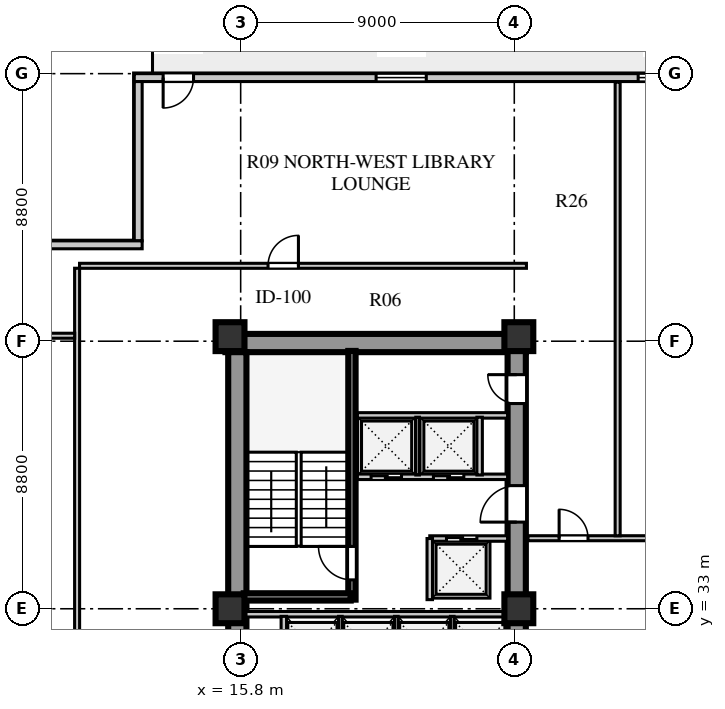
"""IFC4 building model, lengths in metres.
Left out: names, types, materials, properties, quantities, classifications, styles, units other than length and angle.
Written with IfcOpenShell. Run it as: python <this file> out.ifc"""

import sys

from ifc_helpers import new_model, si_unit, direction, frame, frame_2d, origin, origin_2d, place, context, subcontext, project, spatial, rectangle, extrude, element, fill, save


model = new_model("IFC4")
c1 = context("Model", 3, precision=1e-05, world=origin(), true_north=direction((0.0, 1.0)))
c2 = subcontext(c1, "Body", "Model", "MODEL_VIEW")
j1 = project(units=[si_unit("LENGTHUNIT", "METRE"), si_unit("PLANEANGLEUNIT", "RADIAN")], contexts=[c1])
p1 = place(None, origin())
s1 = spatial("IfcSite", under=j1, at=p1, CompositionType="ELEMENT")
p2 = place(p1, origin())
s2 = spatial("IfcBuilding", under=s1, at=p2, CompositionType="ELEMENT")
p3 = place(p2, frame((0.0, 0.0, 66.0)))
s3 = spatial("IfcBuildingStorey", under=s2, at=p3, CompositionType="ELEMENT", Elevation=66.0)
p4 = place(p3, frame((15.3, 41.74, 0.0), z_axis=(0.0, 0.0, 1.0), x_axis=(1.0, 0.0, 0.0)))
e1 = element("IfcWall", 1, at=p4, inside=s3, PredefinedType="SHEAR", context=c2, shape_type="SweptSolid", body=[
    extrude(rectangle(XDim=9.88, YDim=0.6, at=frame_2d((4.94, 0.0))), origin(), (0.0, 0.0, 1.0), 3.72),
])
p5 = place(p3, frame((15.69, 15.81, 0.0), z_axis=(0.0, 0.0, 1.0), x_axis=(0.0, 1.0, 0.0)))
e2 = element("IfcWall", 2, at=p5, inside=s3, PredefinedType="SHEAR", context=c2, shape_type="SweptSolid", body=[
    extrude(rectangle(XDim=25.63, YDim=0.6, at=frame_2d((12.815, 0.0))), origin(), (0.0, 0.0, 1.0), 3.72),
])
p6 = place(p3, frame((24.88, 15.74, 0.0), z_axis=(0.0, 0.0, 1.0), x_axis=(0.0, 1.0, 0.0)))
e3 = element("IfcWall", 3, at=p6, inside=s3, PredefinedType="SHEAR", context=c2, shape_type="SweptSolid", body=[
    extrude(rectangle(XDim=25.76, YDim=0.6, at=frame_2d((12.88, 0.0))), origin(), (0.0, 0.0, 1.0), 3.72),
])
p7 = place(p6, frame((1.61, 0.0, 0.0)))
e4 = element("IfcOpeningElement", 4, at=p7, cuts=e3, PredefinedType="OPENING", context=c2, shape_type="SweptSolid", body=[
    extrude(rectangle(XDim=1.2, YDim=2.1, at=frame_2d((0.6, 1.05))), frame((0.0, 0.31, 0.0), z_axis=(0.0, -1.0, 0.0), x_axis=(1.0, 0.0, 0.0)), (0.0, 0.0, 1.0), 0.62),
])
p8 = place(p6, frame((6.78, 0.0, 0.0)))
e5 = element("IfcOpeningElement", 5, at=p8, cuts=e3, PredefinedType="OPENING", context=c2, shape_type="SweptSolid", body=[
    extrude(rectangle(XDim=0.85, YDim=2.06, at=frame_2d((0.425, 1.03))), frame((0.0, 0.31, 0.0), z_axis=(0.0, -1.0, 0.0), x_axis=(1.0, 0.0, 0.0)), (0.0, 0.0, 1.0), 0.62),
])
p9 = place(p6, frame((12.11, 0.0, 0.0)))
e6 = element("IfcOpeningElement", 6, at=p9, cuts=e3, PredefinedType="OPENING", context=c2, shape_type="SweptSolid", body=[
    extrude(rectangle(XDim=1.5, YDim=2.12, at=frame_2d((0.75, 1.06))), frame((0.0, 0.31, 0.0), z_axis=(0.0, -1.0, 0.0), x_axis=(1.0, 0.0, 0.0)), (0.0, 0.0, 1.0), 0.62),
])
p10 = place(p6, frame((20.11, 0.0, 0.0)))
e7 = element("IfcOpeningElement", 7, at=p10, cuts=e3, PredefinedType="OPENING", context=c2, shape_type="SweptSolid", body=[
    extrude(rectangle(XDim=1.2, YDim=2.12, at=frame_2d((0.6, 1.06))), frame((0.0, 0.31, 0.0), z_axis=(0.0, -1.0, 0.0), x_axis=(1.0, 0.0, 0.0)), (0.0, 0.0, 1.0), 0.62),
])
p11 = place(p6, frame((24.01, 0.0, 0.0)))
e8 = element("IfcOpeningElement", 8, at=p11, cuts=e3, PredefinedType="OPENING", context=c2, shape_type="SweptSolid", body=[
    extrude(rectangle(XDim=0.95, YDim=2.1, at=frame_2d((0.475, 1.05))), frame((0.0, 0.31, 0.0), z_axis=(0.0, -1.0, 0.0), x_axis=(1.0, 0.0, 0.0)), (0.0, 0.0, 1.0), 0.62),
])
for number, where, z_axis, x_axis in (
    (9, (15.45, 33.0, 0.0), (0.0, 0.0, 1.0), (1.0, 0.0, 0.0)),
    (10, (15.45, 41.95, 0.0), (0.0, 0.0, 1.0), (1.0, 0.0, 0.0)),
    (11, (24.95, 33.0, 0.0), (0.0, 0.0, 1.0), (1.0, 0.0, 0.0)),
    (12, (24.95, 41.95, 0.0), (0.0, 0.0, 1.0), (1.0, 0.0, 0.0)),
):
    element("IfcColumn", number, at=place(p3, frame(where, z_axis=z_axis, x_axis=x_axis)), inside=s3, PredefinedType="COLUMN", context=c2, shape_type="SweptSolid", body=[
        extrude(rectangle(XDim=0.95, YDim=0.95, at=origin_2d()), origin(), (0.0, 0.0, 1.0), 3.72),
    ])
p12 = place(p3, frame((46.3, 50.47, 0.0), z_axis=(0.0, 0.0, 1.0), x_axis=(-1.0, 0.0, 0.0)))
e13 = element("IfcWall", 13, at=p12, inside=s3, PredefinedType="SOLIDWALL", context=c2, shape_type="SweptSolid", body=[
    extrude(rectangle(XDim=34.0, YDim=0.26, at=frame_2d((17.0, 0.0))), origin(), (0.0, 0.0, 1.0), 3.72),
])
p13 = place(p12, frame((32.05, 0.0, 0.0)))
e14 = element("IfcOpeningElement", 14, at=p13, cuts=e13, PredefinedType="OPENING", context=c2, shape_type="SweptSolid", body=[
    extrude(rectangle(XDim=1.0, YDim=2.05, at=frame_2d((0.5, 1.025))), frame((0.0, 0.14, 0.0), z_axis=(0.0, -1.0, 0.0), x_axis=(1.0, 0.0, 0.0)), (0.0, 0.0, 1.0), 0.28),
])
p14 = place(p12, frame((24.395, 0.0, 0.8)))
e15 = element("IfcOpeningElement", 15, at=p14, cuts=e13, PredefinedType="OPENING", context=c2, shape_type="SweptSolid", body=[
    extrude(rectangle(XDim=1.65, YDim=1.95, at=frame_2d((0.825, 0.975))), frame((0.0, 0.14, 0.0), z_axis=(0.0, -1.0, 0.0), x_axis=(1.0, 0.0, 0.0)), (0.0, 0.0, 1.0), 0.28),
])
p15 = place(p12, frame((15.475, 0.0, 0.8)))
e16 = element("IfcOpeningElement", 16, at=p15, cuts=e13, PredefinedType="OPENING", context=c2, shape_type="SweptSolid", body=[
    extrude(rectangle(XDim=1.95, YDim=2.0, at=frame_2d((0.975, 1.0))), frame((0.0, 0.14, 0.0), z_axis=(0.0, -1.0, 0.0), x_axis=(1.0, 0.0, 0.0)), (0.0, 0.0, 1.0), 0.28),
])
p16 = place(p12, frame((6.33, 0.0, 0.8)))
e17 = element("IfcOpeningElement", 17, at=p16, cuts=e13, PredefinedType="OPENING", context=c2, shape_type="SweptSolid", body=[
    extrude(rectangle(XDim=2.25, YDim=2.0, at=frame_2d((1.125, 1.0))), frame((0.0, 0.14, 0.0), z_axis=(0.0, -1.0, 0.0), x_axis=(1.0, 0.0, 0.0)), (0.0, 0.0, 1.0), 0.28),
])
p17 = place(p3, frame((12.43, 50.34, 0.0), z_axis=(0.0, 0.0, 1.0), x_axis=(0.0, -1.0, 0.0)))
e18 = element("IfcWall", 18, at=p17, inside=s3, PredefinedType="SOLIDWALL", context=c2, shape_type="SweptSolid", body=[
    extrude(rectangle(XDim=5.24, YDim=0.26, at=frame_2d((2.62, 0.0))), origin(), (0.0, 0.0, 1.0), 3.72),
])
p18 = place(p3, frame((12.56, 44.97, 0.0), z_axis=(0.0, 0.0, 1.0), x_axis=(-1.0, 0.0, 0.0)))
e19 = element("IfcWall", 19, at=p18, inside=s3, PredefinedType="SOLIDWALL", context=c2, shape_type="SweptSolid", body=[
    extrude(rectangle(XDim=5.76, YDim=0.26, at=frame_2d((2.88, 0.0))), origin(), (0.0, 0.0, 1.0), 3.72),
])
p19 = place(p3, frame((15.9, 32.82, 0.0), z_axis=(0.0, 0.0, 1.0), x_axis=(1.0, 0.0, 0.0)))
e20 = element("IfcWall", 20, at=p19, inside=s3, PredefinedType="SOLIDWALL", context=c2, shape_type="SweptSolid", body=[
    extrude(rectangle(XDim=8.68, YDim=0.18, at=frame_2d((4.34, 0.0))), origin(), (0.0, 0.0, 1.0), 3.02),
])
p20 = place(p3, frame((17.22, 30.7, 0.0), z_axis=(0.0, 0.0, 1.0), x_axis=(0.0, 1.0, 0.0)))
e21 = element("IfcWall", 21, at=p20, inside=s3, PredefinedType="SOLIDWALL", context=c2, shape_type="SweptSolid", body=[
    extrude(rectangle(XDim=2.05, YDim=0.18, at=frame_2d((1.025, 0.0))), origin(), (0.0, 0.0, 1.0), 3.72),
])
for number, where, z_axis, x_axis in (
    (22, (19.08, 30.7, 0.0), (0.0, 0.0, 1.0), (0.0, 1.0, 0.0)),
    (23, (20.92, 30.7, 0.0), (0.0, 0.0, 1.0), (0.0, 1.0, 0.0)),
    (24, (22.76, 30.7, 0.0), (0.0, 0.0, 1.0), (0.0, 1.0, 0.0)),
):
    element("IfcWall", number, at=place(p3, frame(where, z_axis=z_axis, x_axis=x_axis)), inside=s3, PredefinedType="PARTITIONING", context=c2, shape_type="SweptSolid", body=[
        extrude(rectangle(XDim=2.05, YDim=0.12, at=frame_2d((1.025, 0.0))), origin(), (0.0, 0.0, 1.0), 3.72),
    ])
p21 = place(p3, frame((19.46, 33.3, 0.0), z_axis=(0.0, 0.0, 1.0), x_axis=(0.0, 1.0, 0.0)))
e25 = element("IfcWall", 25, at=p21, inside=s3, PredefinedType="SHEAR", context=c2, shape_type="SweptSolid", body=[
    extrude(rectangle(XDim=8.18, YDim=0.24, at=frame_2d((4.09, 0.0))), origin(), (0.0, 0.0, 1.0), 4.0),
])
p22 = place(p21, frame((0.65, 0.0, 0.0)))
e26 = element("IfcOpeningElement", 26, at=p22, cuts=e25, PredefinedType="OPENING", context=c2, shape_type="SweptSolid", body=[
    extrude(rectangle(XDim=1.1, YDim=2.1, at=frame_2d((0.55, 1.05))), frame((0.0, 0.13, 0.0), z_axis=(0.0, -1.0, 0.0), x_axis=(1.0, 0.0, 0.0)), (0.0, 0.0, 1.0), 0.26),
])
p23 = place(p3, frame((15.9, 33.39, 0.0), z_axis=(0.0, 0.0, 1.0), x_axis=(1.0, 0.0, 0.0)))
e27 = element("IfcWall", 27, at=p23, inside=s3, PredefinedType="SHEAR", context=c2, shape_type="SweptSolid", body=[
    extrude(rectangle(XDim=3.52, YDim=0.24, at=frame_2d((1.76, 0.0))), origin(), (0.0, 0.0, 1.0), 4.0),
])
p24 = place(p3, frame((22.02, 35.31, 0.0), z_axis=(0.0, 0.0, 1.0), x_axis=(1.0, 0.0, 0.0)))
e28 = element("IfcWall", 28, at=p24, inside=s3, PredefinedType="SOLIDWALL", context=c2, shape_type="SweptSolid", body=[
    extrude(rectangle(XDim=2.56, YDim=0.18, at=frame_2d((1.28, 0.0))), origin(), (0.0, 0.0, 1.0), 3.72),
])
p25 = place(p24, frame((0.55, 0.0, 0.0)))
e29 = element("IfcOpeningElement", 29, at=p25, cuts=e28, PredefinedType="OPENING", context=c2, shape_type="SweptSolid", body=[
    extrude(rectangle(XDim=1.0, YDim=2.1, at=frame_2d((0.5, 1.05))), frame((0.0, 0.1, 0.0), z_axis=(0.0, -1.0, 0.0), x_axis=(1.0, 0.0, 0.0)), (0.0, 0.0, 1.0), 0.2),
])
p26 = place(p3, frame((22.02, 33.3, 0.0), z_axis=(0.0, 0.0, 1.0), x_axis=(0.0, 1.0, 0.0)))
e30 = element("IfcWall", 30, at=p26, inside=s3, PredefinedType="SOLIDWALL", context=c2, shape_type="SweptSolid", body=[
    extrude(rectangle(XDim=2.01, YDim=0.18, at=frame_2d((1.005, 0.0))), origin(), (0.0, 0.0, 1.0), 3.72),
])
p27 = place(p3, frame((19.64, 37.34, 0.0), z_axis=(0.0, 0.0, 1.0), x_axis=(1.0, 0.0, 0.0)))
e31 = element("IfcWall", 31, at=p27, inside=s3, PredefinedType="SOLIDWALL", context=c2, shape_type="SweptSolid", body=[
    extrude(rectangle(XDim=4.94, YDim=0.18, at=frame_2d((2.47, 0.0))), origin(), (0.0, 0.0, 1.0), 3.72),
])
p28 = place(p27, frame((0.45, 0.0, 0.0)))
e32 = element("IfcOpeningElement", 32, at=p28, cuts=e31, PredefinedType="OPENING", context=c2, shape_type="SweptSolid", body=[
    extrude(rectangle(XDim=1.0, YDim=2.1, at=frame_2d((0.5, 1.05))), frame((0.0, 0.1, 0.0), z_axis=(0.0, -1.0, 0.0), x_axis=(1.0, 0.0, 0.0)), (0.0, 0.0, 1.0), 0.2),
])
p29 = place(p27, frame((2.5, 0.0, 0.0)))
e33 = element("IfcOpeningElement", 33, at=p29, cuts=e31, PredefinedType="OPENING", context=c2, shape_type="SweptSolid", body=[
    extrude(rectangle(XDim=1.0, YDim=2.1, at=frame_2d((0.5, 1.05))), frame((0.0, 0.1, 0.0), z_axis=(0.0, -1.0, 0.0), x_axis=(1.0, 0.0, 0.0)), (0.0, 0.0, 1.0), 0.2),
])
p30 = place(p3, frame((19.64, 39.36, 0.0), z_axis=(0.0, 0.0, 1.0), x_axis=(1.0, 0.0, 0.0)))
e34 = element("IfcWall", 34, at=p30, inside=s3, PredefinedType="SOLIDWALL", context=c2, shape_type="SweptSolid", body=[
    extrude(rectangle(XDim=4.94, YDim=0.18, at=frame_2d((2.47, 0.0))), origin(), (0.0, 0.0, 1.0), 3.72),
])
p31 = place(p3, frame((21.62, 37.4, 0.0), z_axis=(0.0, 0.0, 1.0), x_axis=(0.0, 1.0, 0.0)))
e35 = element("IfcWall", 35, at=p31, inside=s3, PredefinedType="PARTITIONING", context=c2, shape_type="SweptSolid", body=[
    extrude(rectangle(XDim=1.9, YDim=0.12, at=frame_2d((0.95, 0.0))), origin(), (0.0, 0.0, 1.0), 3.72),
])
p32 = place(p3, frame((23.66, 37.4, 0.0), z_axis=(0.0, 0.0, 1.0), x_axis=(0.0, 1.0, 0.0)))
e36 = element("IfcWall", 36, at=p32, inside=s3, PredefinedType="SOLIDWALL", context=c2, shape_type="SweptSolid", body=[
    extrude(rectangle(XDim=1.9, YDim=0.18, at=frame_2d((0.95, 0.0))), origin(), (0.0, 0.0, 1.0), 3.72),
])
p33 = place(p3, frame((25.25, 35.32, 0.0), z_axis=(0.0, 0.0, 1.0), x_axis=(1.0, 0.0, 0.0)))
e37 = element("IfcWall", 37, at=p33, inside=s3, PredefinedType="PARTITIONING", context=c2, shape_type="SweptSolid", body=[
    extrude(rectangle(XDim=9.47, YDim=0.165, at=frame_2d((4.735, 0.0))), origin(), (0.0, 0.0, 1.0), 3.72),
])
p34 = place(p33, frame((1.025, 0.0, 0.0)))
e38 = element("IfcOpeningElement", 38, at=p34, cuts=e37, PredefinedType="OPENING", context=c2, shape_type="SweptSolid", body=[
    extrude(rectangle(XDim=0.95, YDim=2.08, at=frame_2d((0.475, 1.04))), frame((0.0, 0.093, 0.0), z_axis=(0.0, -1.0, 0.0), x_axis=(1.0, 0.0, 0.0)), (0.0, 0.0, 1.0), 0.185),
])
p35 = place(p33, frame((4.125, 0.0, 0.0)))
e39 = element("IfcOpeningElement", 39, at=p35, cuts=e37, PredefinedType="OPENING", context=c2, shape_type="SweptSolid", body=[
    extrude(rectangle(XDim=0.95, YDim=2.08, at=frame_2d((0.475, 1.04))), frame((0.0, 0.093, 0.0), z_axis=(0.0, -1.0, 0.0), x_axis=(1.0, 0.0, 0.0)), (0.0, 0.0, 1.0), 0.185),
])
p36 = place(p33, frame((7.365, 0.0, 0.0)))
e40 = element("IfcOpeningElement", 40, at=p36, cuts=e37, PredefinedType="OPENING", context=c2, shape_type="SweptSolid", body=[
    extrude(rectangle(XDim=0.95, YDim=2.08, at=frame_2d((0.475, 1.04))), frame((0.0, 0.093, 0.0), z_axis=(0.0, -1.0, 0.0), x_axis=(1.0, 0.0, 0.0)), (0.0, 0.0, 1.0), 0.185),
])
p37 = place(p3, frame((10.42, 13.0, 0.0), z_axis=(0.0, 0.0, 1.0), x_axis=(0.0, 1.0, 0.0)))
e41 = element("IfcWall", 41, at=p37, inside=s3, PredefinedType="PARTITIONING", context=c2, shape_type="SweptSolid", body=[
    extrude(rectangle(XDim=31.2, YDim=0.165, at=frame_2d((15.6, 0.0))), origin(), (0.0, 0.0, 1.0), 3.72),
])
p38 = place(p37, frame((15.15, 0.0, 0.0)))
e42 = element("IfcOpeningElement", 42, at=p38, cuts=e41, PredefinedType="OPENING", context=c2, shape_type="SweptSolid", body=[
    extrude(rectangle(XDim=0.95, YDim=2.08, at=frame_2d((0.475, 1.04))), frame((0.0, 0.093, 0.0), z_axis=(0.0, -1.0, 0.0), x_axis=(1.0, 0.0, 0.0)), (0.0, 0.0, 1.0), 0.185),
])
p39 = place(p3, frame((7.08, 41.98, 0.0), z_axis=(0.0, 0.0, 1.0), x_axis=(1.0, 0.0, 0.0)))
e43 = element("IfcWall", 43, at=p39, inside=s3, PredefinedType="PARTITIONING", context=c2, shape_type="SweptSolid", body=[
    extrude(rectangle(XDim=3.26, YDim=0.165, at=frame_2d((1.63, 0.0))), origin(), (0.0, 0.0, 1.0), 3.22),
])
p40 = place(p3, frame((10.5, 44.28, 0.0), z_axis=(0.0, 0.0, 1.0), x_axis=(1.0, 0.0, 0.0)))
e44 = element("IfcWall", 44, at=p40, inside=s3, PredefinedType="PARTITIONING", context=c2, shape_type="SweptSolid", body=[
    extrude(rectangle(XDim=14.7, YDim=0.165, at=frame_2d((7.35, 0.0))), origin(), (0.0, 0.0, 1.0), 3.72),
])
p41 = place(p40, frame((6.2, 0.0, 0.0)))
e45 = element("IfcOpeningElement", 45, at=p41, cuts=e44, PredefinedType="OPENING", context=c2, shape_type="SweptSolid", body=[
    extrude(rectangle(XDim=1.0, YDim=2.08, at=frame_2d((0.5, 1.04))), frame((0.0, 0.093, 0.0), z_axis=(0.0, -1.0, 0.0), x_axis=(1.0, 0.0, 0.0)), (0.0, 0.0, 1.0), 0.185),
])
p42 = place(p3, frame((28.2, 35.4, 0.0), z_axis=(0.0, 0.0, 1.0), x_axis=(0.0, 1.0, 0.0)))
e46 = element("IfcWall", 46, at=p42, inside=s3, PredefinedType="PARTITIONING", context=c2, shape_type="SweptSolid", body=[
    extrude(rectangle(XDim=14.92, YDim=0.165, at=frame_2d((7.46, 0.0))), origin(), (0.0, 0.0, 1.0), 3.72),
])
p43 = place(p13, frame((1.0, 0.0, 0.0), z_axis=(0.0, 0.0, 1.0), x_axis=(-1.0, 0.0, 0.0)))
e47 = element("IfcDoor", 47, at=p43, inside=s3, OperationType="SINGLE_SWING_LEFT", PredefinedType="DOOR", context=c2, shape_type="SweptSolid", body=[
    extrude(rectangle(XDim=1.0, YDim=2.05, at=frame_2d((0.5, 1.025))), frame((0.0, 0.025, 0.0), z_axis=(0.0, -1.0, 0.0), x_axis=(1.0, 0.0, 0.0)), (0.0, 0.0, 1.0), 0.05),
])
fill(e14, e47)
p44 = place(p14, origin())
e48 = element("IfcWindow", 48, at=p44, inside=s3, PartitioningType="SINGLE_PANEL", PredefinedType="WINDOW", context=c2, shape_type="SweptSolid", body=[
    extrude(rectangle(XDim=1.65, YDim=1.95, at=frame_2d((0.825, 0.975))), frame((0.0, 0.03, 0.0), z_axis=(0.0, -1.0, 0.0), x_axis=(1.0, 0.0, 0.0)), (0.0, 0.0, 1.0), 0.06),
])
fill(e15, e48)
p45 = place(p15, origin())
e49 = element("IfcWindow", 49, at=p45, inside=s3, PartitioningType="SINGLE_PANEL", PredefinedType="WINDOW", context=c2, shape_type="SweptSolid", body=[
    extrude(rectangle(XDim=1.95, YDim=2.0, at=frame_2d((0.975, 1.0))), frame((0.0, 0.03, 0.0), z_axis=(0.0, -1.0, 0.0), x_axis=(1.0, 0.0, 0.0)), (0.0, 0.0, 1.0), 0.06),
])
fill(e16, e49)
p46 = place(p22, origin())
e50 = element("IfcDoor", 50, at=p46, inside=s3, OperationType="SINGLE_SWING_RIGHT", PredefinedType="DOOR", context=c2, shape_type="SweptSolid", body=[
    extrude(rectangle(XDim=1.1, YDim=2.1, at=frame_2d((0.55, 1.05))), frame((0.0, 0.025, 0.0), z_axis=(0.0, -1.0, 0.0), x_axis=(1.0, 0.0, 0.0)), (0.0, 0.0, 1.0), 0.05),
])
fill(e26, e50)
p47 = place(p10, frame((1.2, 0.0, 0.0), z_axis=(0.0, 0.0, 1.0), x_axis=(-1.0, 0.0, 0.0)))
e51 = element("IfcDoor", 51, at=p47, inside=s3, OperationType="SINGLE_SWING_RIGHT", PredefinedType="DOOR", context=c2, shape_type="SweptSolid", body=[
    extrude(rectangle(XDim=1.2, YDim=2.12, at=frame_2d((0.6, 1.06))), frame((0.0, 0.025, 0.0), z_axis=(0.0, -1.0, 0.0), x_axis=(1.0, 0.0, 0.0)), (0.0, 0.0, 1.0), 0.05),
])
fill(e7, e51)
p48 = place(p28, frame((1.0, 0.0, 0.0), z_axis=(0.0, 0.0, 1.0), x_axis=(-1.0, 0.0, 0.0)))
e52 = element("IfcDoor", 52, at=p48, inside=s3, OperationType="DOUBLE_DOOR_SLIDING", PredefinedType="DOOR", context=c2, shape_type="SweptSolid", body=[
    extrude(rectangle(XDim=1.0, YDim=2.1, at=frame_2d((0.5, 1.05))), frame((0.0, 0.025, 0.0), z_axis=(0.0, -1.0, 0.0), x_axis=(1.0, 0.0, 0.0)), (0.0, 0.0, 1.0), 0.05),
])
fill(e32, e52)
p49 = place(p29, frame((1.0, 0.0, 0.0), z_axis=(0.0, 0.0, 1.0), x_axis=(-1.0, 0.0, 0.0)))
e53 = element("IfcDoor", 53, at=p49, inside=s3, OperationType="DOUBLE_DOOR_SLIDING", PredefinedType="DOOR", context=c2, shape_type="SweptSolid", body=[
    extrude(rectangle(XDim=1.0, YDim=2.1, at=frame_2d((0.5, 1.05))), frame((0.0, 0.025, 0.0), z_axis=(0.0, -1.0, 0.0), x_axis=(1.0, 0.0, 0.0)), (0.0, 0.0, 1.0), 0.05),
])
fill(e33, e53)
p50 = place(p25, origin())
e54 = element("IfcDoor", 54, at=p50, inside=s3, OperationType="DOUBLE_DOOR_SLIDING", PredefinedType="DOOR", context=c2, shape_type="SweptSolid", body=[
    extrude(rectangle(XDim=1.0, YDim=2.1, at=frame_2d((0.5, 1.05))), frame((0.0, 0.025, 0.0), z_axis=(0.0, -1.0, 0.0), x_axis=(1.0, 0.0, 0.0)), (0.0, 0.0, 1.0), 0.05),
])
fill(e29, e54)
p51 = place(p11, frame((0.95, 0.0, 0.0), z_axis=(0.0, 0.0, 1.0), x_axis=(-1.0, 0.0, 0.0)))
e55 = element("IfcDoor", 55, at=p51, inside=s3, OperationType="SINGLE_SWING_LEFT", PredefinedType="DOOR", context=c2, shape_type="SweptSolid", body=[
    extrude(rectangle(XDim=0.95, YDim=2.1, at=frame_2d((0.475, 1.05))), frame((0.0, 0.025, 0.0), z_axis=(0.0, -1.0, 0.0), x_axis=(1.0, 0.0, 0.0)), (0.0, 0.0, 1.0), 0.05),
])
fill(e8, e55)
p52 = place(p41, origin())
e56 = element("IfcDoor", 56, at=p52, inside=s3, OperationType="SINGLE_SWING_RIGHT", PredefinedType="DOOR", context=c2, shape_type="SweptSolid", body=[
    extrude(rectangle(XDim=1.0, YDim=2.08, at=frame_2d((0.5, 1.04))), frame((0.0, 0.025, 0.0), z_axis=(0.0, -1.0, 0.0), x_axis=(1.0, 0.0, 0.0)), (0.0, 0.0, 1.0), 0.05),
])
fill(e45, e56)
p53 = place(p34, origin())
e57 = element("IfcDoor", 57, at=p53, inside=s3, OperationType="SINGLE_SWING_LEFT", PredefinedType="DOOR", context=c2, shape_type="SweptSolid", body=[
    extrude(rectangle(XDim=0.95, YDim=2.08, at=frame_2d((0.475, 1.04))), frame((0.0, 0.025, 0.0), z_axis=(0.0, -1.0, 0.0), x_axis=(1.0, 0.0, 0.0)), (0.0, 0.0, 1.0), 0.05),
])
fill(e38, e57)
save(model, sys.argv[1])
